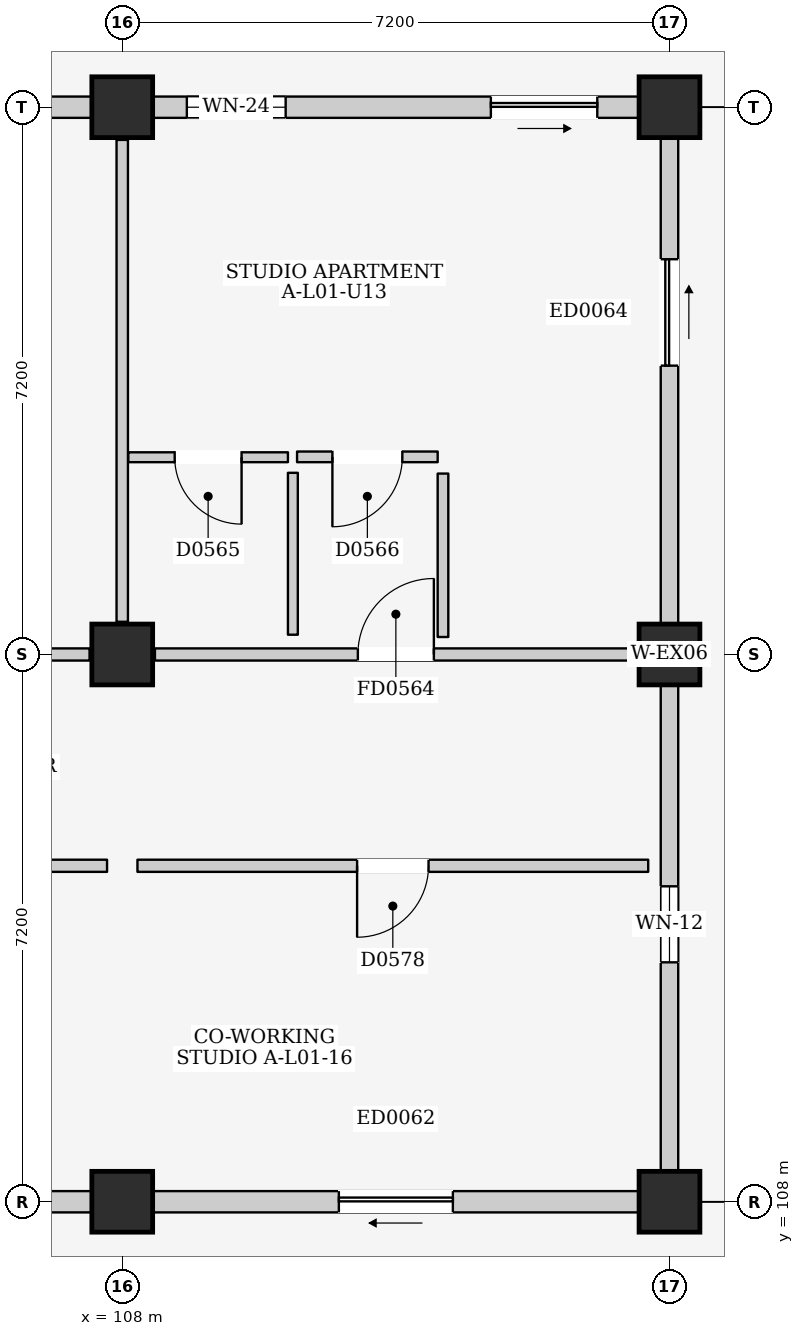
"""IFC4 building model, lengths in metres.
Left out: names, types, materials, properties, quantities, classifications, styles, units other than length and angle.
Written with IfcOpenShell. Run it as: python <this file> out.ifc"""

import sys

from ifc_helpers import new_model, si_unit, direction, frame, frame_2d, origin, origin_2d, place, context, subcontext, project, spatial, rectangle, extrude, element, fill, save


model = new_model("IFC4")
c1 = context("Model", 3, precision=1e-05, world=origin(), true_north=direction((0.0, 1.0)))
c2 = subcontext(c1, "Body", "Model", "MODEL_VIEW")
j1 = project(units=[si_unit("LENGTHUNIT", "METRE"), si_unit("PLANEANGLEUNIT", "RADIAN")], contexts=[c1])
p1 = place(None, origin())
s1 = spatial("IfcSite", under=j1, at=p1, CompositionType="ELEMENT")
p2 = place(p1, origin())
s2 = spatial("IfcBuilding", under=s1, at=p2, CompositionType="ELEMENT")
p3 = place(p2, frame((0.0, 0.0, 4.5)))
s3 = spatial("IfcBuildingStorey", under=s2, at=p3, CompositionType="ELEMENT", Elevation=4.5)
for number, where, z_axis, x_axis in (
    (1, (108.0, 108.0, 0.0), (0.0, 0.0, 1.0), (1.0, 0.0, 0.0)),
    (2, (108.0, 115.2, 0.0), (0.0, 0.0, 1.0), (1.0, 0.0, 0.0)),
    (3, (108.0, 122.4, 0.0), (0.0, 0.0, 1.0), (1.0, 0.0, 0.0)),
    (4, (115.2, 108.0, 0.0), (0.0, 0.0, 1.0), (1.0, 0.0, 0.0)),
    (5, (115.2, 115.2, 0.0), (0.0, 0.0, 1.0), (1.0, 0.0, 0.0)),
    (6, (115.2, 122.4, 0.0), (0.0, 0.0, 1.0), (1.0, 0.0, 0.0)),
):
    element("IfcColumn", number, at=place(p3, frame(where, z_axis=z_axis, x_axis=x_axis)), inside=s3, PredefinedType="COLUMN", context=c2, shape_type="SweptSolid", body=[
        extrude(rectangle(XDim=0.8, YDim=0.8, at=origin_2d()), origin(), (0.0, 0.0, 1.0), 4.5),
    ])
p4 = place(p3, frame((101.2, 122.4, 0.0), z_axis=(0.0, 0.0, 1.0), x_axis=(1.0, 0.0, 0.0)))
e7 = element("IfcWall", 7, at=p4, inside=s3, PredefinedType="ELEMENTEDWALL", context=c2, shape_type="SweptSolid", body=[
    extrude(rectangle(XDim=6.4, YDim=0.28, at=frame_2d((3.2, 0.0))), origin(), (0.0, 0.0, 1.0), 3.715),
])
p5 = place(p4, frame((3.85, 0.0, 0.0)))
e8 = element("IfcOpeningElement", 8, at=p5, cuts=e7, PredefinedType="OPENING", context=c2, shape_type="SweptSolid", body=[
    extrude(rectangle(XDim=2.0, YDim=2.12, at=frame_2d((1.0, 1.06))), frame((0.0, 0.155, 0.0), z_axis=(0.0, -1.0, 0.0), x_axis=(1.0, 0.0, 0.0)), (0.0, 0.0, 1.0), 0.31),
])
p6 = place(p4, frame((0.45, 0.0, 0.9)))
e9 = element("IfcOpeningElement", 9, at=p6, cuts=e7, PredefinedType="OPENING", context=c2, shape_type="SweptSolid", body=[
    extrude(rectangle(XDim=1.85, YDim=1.4, at=frame_2d((0.925, 0.7))), frame((0.0, 0.155, 0.0), z_axis=(0.0, -1.0, 0.0), x_axis=(1.0, 0.0, 0.0)), (0.0, 0.0, 1.0), 0.31),
])
p7 = place(p3, frame((101.2, 108.0, 0.0), z_axis=(0.0, 0.0, 1.0), x_axis=(1.0, 0.0, 0.0)))
e10 = element("IfcWall", 10, at=p7, inside=s3, PredefinedType="ELEMENTEDWALL", context=c2, shape_type="SweptSolid", body=[
    extrude(rectangle(XDim=6.4, YDim=0.28, at=frame_2d((3.2, 0.0))), origin(), (0.0, 0.0, 1.0), 3.585),
])
p8 = place(p7, frame((2.45, 0.0, 0.0)))
e11 = element("IfcOpeningElement", 11, at=p8, cuts=e10, PredefinedType="OPENING", context=c2, shape_type="SweptSolid", body=[
    extrude(rectangle(XDim=1.5, YDim=2.12, at=frame_2d((0.75, 1.06))), frame((0.0, 0.155, 0.0), z_axis=(0.0, -1.0, 0.0), x_axis=(1.0, 0.0, 0.0)), (0.0, 0.0, 1.0), 0.31),
])
p9 = place(p3, frame((108.4, 122.4, 0.0), z_axis=(0.0, 0.0, 1.0), x_axis=(1.0, 0.0, 0.0)))
e12 = element("IfcWall", 12, at=p9, inside=s3, PredefinedType="ELEMENTEDWALL", context=c2, shape_type="SweptSolid", body=[
    extrude(rectangle(XDim=6.4, YDim=0.28, at=frame_2d((3.2, 0.0))), origin(), (0.0, 0.0, 1.0), 3.715),
])
p10 = place(p9, frame((4.45, 0.0, 0.0)))
e13 = element("IfcOpeningElement", 13, at=p10, cuts=e12, PredefinedType="OPENING", context=c2, shape_type="SweptSolid", body=[
    extrude(rectangle(XDim=1.4, YDim=2.1, at=frame_2d((0.7, 1.05))), frame((0.0, 0.155, 0.0), z_axis=(0.0, -1.0, 0.0), x_axis=(1.0, 0.0, 0.0)), (0.0, 0.0, 1.0), 0.31),
])
p11 = place(p9, frame((0.45, 0.0, 0.9)))
e14 = element("IfcOpeningElement", 14, at=p11, cuts=e12, PredefinedType="OPENING", context=c2, shape_type="SweptSolid", body=[
    extrude(rectangle(XDim=1.3, YDim=1.25, at=frame_2d((0.65, 0.625))), frame((0.0, 0.155, 0.0), z_axis=(0.0, -1.0, 0.0), x_axis=(1.0, 0.0, 0.0)), (0.0, 0.0, 1.0), 0.31),
])
p12 = place(p3, frame((108.4, 108.0, 0.0), z_axis=(0.0, 0.0, 1.0), x_axis=(1.0, 0.0, 0.0)))
e15 = element("IfcWall", 15, at=p12, inside=s3, PredefinedType="ELEMENTEDWALL", context=c2, shape_type="SweptSolid", body=[
    extrude(rectangle(XDim=6.4, YDim=0.28, at=frame_2d((3.2, 0.0))), origin(), (0.0, 0.0, 1.0), 3.585),
])
p13 = place(p12, frame((2.45, 0.0, 0.0)))
e16 = element("IfcOpeningElement", 16, at=p13, cuts=e15, PredefinedType="OPENING", context=c2, shape_type="SweptSolid", body=[
    extrude(rectangle(XDim=1.5, YDim=2.12, at=frame_2d((0.75, 1.06))), frame((0.0, 0.155, 0.0), z_axis=(0.0, -1.0, 0.0), x_axis=(1.0, 0.0, 0.0)), (0.0, 0.0, 1.0), 0.31),
])
p14 = place(p3, frame((115.2, 108.4, 0.0), z_axis=(0.0, 0.0, 1.0), x_axis=(0.0, 1.0, 0.0)))
e17 = element("IfcWall", 17, at=p14, inside=s3, PredefinedType="ELEMENTEDWALL", context=c2, shape_type="SweptSolid", body=[
    extrude(rectangle(XDim=6.4, YDim=0.23, at=frame_2d((3.2, 0.0))), origin(), (0.0, 0.0, 1.0), 3.715),
])
p15 = place(p14, frame((2.75, 0.0, 1.1)))
e18 = element("IfcOpeningElement", 18, at=p15, cuts=e17, PredefinedType="OPENING", context=c2, shape_type="SweptSolid", body=[
    extrude(rectangle(XDim=1.0, YDim=0.9, at=frame_2d((0.5, 0.45))), frame((0.0, 0.13, 0.0), z_axis=(0.0, -1.0, 0.0), x_axis=(1.0, 0.0, 0.0)), (0.0, 0.0, 1.0), 0.26),
])
p16 = place(p3, frame((115.2, 115.6, 0.0), z_axis=(0.0, 0.0, 1.0), x_axis=(0.0, 1.0, 0.0)))
e19 = element("IfcWall", 19, at=p16, inside=s3, PredefinedType="ELEMENTEDWALL", context=c2, shape_type="SweptSolid", body=[
    extrude(rectangle(XDim=6.4, YDim=0.23, at=frame_2d((3.2, 0.0))), origin(), (0.0, 0.0, 1.0), 3.715),
])
p17 = place(p16, frame((3.4, 0.0, 0.0)))
e20 = element("IfcOpeningElement", 20, at=p17, cuts=e19, PredefinedType="OPENING", context=c2, shape_type="SweptSolid", body=[
    extrude(rectangle(XDim=1.4, YDim=2.1, at=frame_2d((0.7, 1.05))), frame((0.0, 0.13, 0.0), z_axis=(0.0, -1.0, 0.0), x_axis=(1.0, 0.0, 0.0)), (0.0, 0.0, 1.0), 0.26),
])
p18 = place(p3, frame((101.23, 115.2, 0.0), z_axis=(0.0, 0.0, 1.0), x_axis=(1.0, 0.0, 0.0)))
e21 = element("IfcWall", 21, at=p18, inside=s3, PredefinedType="PARTITIONING", context=c2, shape_type="SweptSolid", body=[
    extrude(rectangle(XDim=6.34, YDim=0.16, at=frame_2d((3.17, 0.0))), origin(), (0.0, 0.0, 1.0), 3.585),
])
p19 = place(p18, frame((2.67, 0.0, 0.0)))
e22 = element("IfcOpeningElement", 22, at=p19, cuts=e21, PredefinedType="OPENING", context=c2, shape_type="SweptSolid", body=[
    extrude(rectangle(XDim=1.0, YDim=2.15, at=frame_2d((0.5, 1.075))), frame((0.0, 0.095, 0.0), z_axis=(0.0, -1.0, 0.0), x_axis=(1.0, 0.0, 0.0)), (0.0, 0.0, 1.0), 0.19),
])
p20 = place(p3, frame((108.0, 115.63, 0.0), z_axis=(0.0, 0.0, 1.0), x_axis=(0.0, 1.0, 0.0)))
e23 = element("IfcWall", 23, at=p20, inside=s3, PredefinedType="PARTITIONING", context=c2, shape_type="SweptSolid", body=[
    extrude(rectangle(XDim=6.34, YDim=0.15, at=frame_2d((3.17, 0.0))), origin(), (0.0, 0.0, 1.0), 3.685),
])
p21 = place(p3, frame((108.43, 115.2, 0.0), z_axis=(0.0, 0.0, 1.0), x_axis=(1.0, 0.0, 0.0)))
e24 = element("IfcWall", 24, at=p21, inside=s3, PredefinedType="PARTITIONING", context=c2, shape_type="SweptSolid", body=[
    extrude(rectangle(XDim=6.34, YDim=0.16, at=frame_2d((3.17, 0.0))), origin(), (0.0, 0.0, 1.0), 3.585),
])
p22 = place(p21, frame((2.67, 0.0, 0.0)))
e25 = element("IfcOpeningElement", 25, at=p22, cuts=e24, PredefinedType="OPENING", context=c2, shape_type="SweptSolid", body=[
    extrude(rectangle(XDim=1.0, YDim=2.15, at=frame_2d((0.5, 1.075))), frame((0.0, 0.095, 0.0), z_axis=(0.0, -1.0, 0.0), x_axis=(1.0, 0.0, 0.0)), (0.0, 0.0, 1.0), 0.19),
])
p23 = place(p3, frame((108.08, 117.795, 0.0), z_axis=(0.0, 0.0, 1.0), x_axis=(1.0, 0.0, 0.0)))
e26 = element("IfcWall", 26, at=p23, inside=s3, PredefinedType="PARTITIONING", context=c2, shape_type="SweptSolid", body=[
    extrude(rectangle(XDim=2.1, YDim=0.13, at=frame_2d((1.05, 0.0))), origin(), (0.0, 0.0, 1.0), 4.25),
])
p24 = place(p23, frame((0.61, 0.0, 0.0)))
e27 = element("IfcOpeningElement", 27, at=p24, cuts=e26, PredefinedType="OPENING", context=c2, shape_type="SweptSolid", body=[
    extrude(rectangle(XDim=0.88, YDim=2.1, at=frame_2d((0.44, 1.05))), frame((0.0, 0.08, 0.0), z_axis=(0.0, -1.0, 0.0), x_axis=(1.0, 0.0, 0.0)), (0.0, 0.0, 1.0), 0.16),
])
p25 = place(p3, frame((110.245, 115.46, 0.0), z_axis=(0.0, 0.0, 1.0), x_axis=(0.0, 1.0, 0.0)))
e28 = element("IfcWall", 28, at=p25, inside=s3, PredefinedType="PARTITIONING", context=c2, shape_type="SweptSolid", body=[
    extrude(rectangle(XDim=2.13, YDim=0.13, at=frame_2d((1.065, 0.0))), origin(), (0.0, 0.0, 1.0), 4.25),
])
p26 = place(p3, frame((110.3, 117.8, 0.0), z_axis=(0.0, 0.0, 1.0), x_axis=(1.0, 0.0, 0.0)))
e29 = element("IfcWall", 29, at=p26, inside=s3, PredefinedType="PARTITIONING", context=c2, shape_type="SweptSolid", body=[
    extrude(rectangle(XDim=1.85, YDim=0.14, at=frame_2d((0.925, 0.0))), origin(), (0.0, 0.0, 1.0), 4.25),
])
p27 = place(p26, frame((0.465, 0.0, 0.0)))
e30 = element("IfcOpeningElement", 30, at=p27, cuts=e29, PredefinedType="OPENING", context=c2, shape_type="SweptSolid", body=[
    extrude(rectangle(XDim=0.92, YDim=2.1, at=frame_2d((0.46, 1.05))), frame((0.0, 0.085, 0.0), z_axis=(0.0, -1.0, 0.0), x_axis=(1.0, 0.0, 0.0)), (0.0, 0.0, 1.0), 0.17),
])
p28 = place(p3, frame((112.22, 115.43, 0.0), z_axis=(0.0, 0.0, 1.0), x_axis=(0.0, 1.0, 0.0)))
e31 = element("IfcWall", 31, at=p28, inside=s3, PredefinedType="PARTITIONING", context=c2, shape_type="SweptSolid", body=[
    extrude(rectangle(XDim=2.15, YDim=0.14, at=frame_2d((1.075, 0.0))), origin(), (0.0, 0.0, 1.0), 4.25),
])
p29 = place(p3, frame((101.0, 112.42, 0.0), z_axis=(0.0, 0.0, 1.0), x_axis=(1.0, 0.0, 0.0)))
e32 = element("IfcWall", 32, at=p29, inside=s3, PredefinedType="PARTITIONING", context=c2, shape_type="SweptSolid", body=[
    extrude(rectangle(XDim=6.8, YDim=0.16, at=frame_2d((3.4, 0.0))), origin(), (0.0, 0.0, 1.0), 4.25),
])
p30 = place(p29, frame((2.93, 0.0, 0.0)))
e33 = element("IfcOpeningElement", 33, at=p30, cuts=e32, PredefinedType="OPENING", context=c2, shape_type="SweptSolid", body=[
    extrude(rectangle(XDim=0.94, YDim=2.12, at=frame_2d((0.47, 1.06))), frame((0.0, 0.095, 0.0), z_axis=(0.0, -1.0, 0.0), x_axis=(1.0, 0.0, 0.0)), (0.0, 0.0, 1.0), 0.19),
])
p31 = place(p3, frame((108.2, 112.42, 0.0), z_axis=(0.0, 0.0, 1.0), x_axis=(1.0, 0.0, 0.0)))
e34 = element("IfcWall", 34, at=p31, inside=s3, PredefinedType="PARTITIONING", context=c2, shape_type="SweptSolid", body=[
    extrude(rectangle(XDim=6.72, YDim=0.16, at=frame_2d((3.36, 0.0))), origin(), (0.0, 0.0, 1.0), 4.25),
])
p32 = place(p31, frame((2.89, 0.0, 0.0)))
e35 = element("IfcOpeningElement", 35, at=p32, cuts=e34, PredefinedType="OPENING", context=c2, shape_type="SweptSolid", body=[
    extrude(rectangle(XDim=0.94, YDim=2.12, at=frame_2d((0.47, 1.06))), frame((0.0, 0.095, 0.0), z_axis=(0.0, -1.0, 0.0), x_axis=(1.0, 0.0, 0.0)), (0.0, 0.0, 1.0), 0.19),
])
p33 = place(p10, frame((1.4, 0.0, 0.0), z_axis=(0.0, 0.0, 1.0), x_axis=(-1.0, 0.0, 0.0)))
e36 = element("IfcDoor", 36, at=p33, inside=s3, OperationType="SLIDING_TO_RIGHT", PredefinedType="DOOR", context=c2, shape_type="SweptSolid", body=[
    extrude(rectangle(XDim=1.4, YDim=2.1, at=frame_2d((0.7, 1.05))), frame((0.0, 0.025, 0.0), z_axis=(0.0, -1.0, 0.0), x_axis=(1.0, 0.0, 0.0)), (0.0, 0.0, 1.0), 0.05),
])
fill(e13, e36)
p34 = place(p11, origin())
e37 = element("IfcWindow", 37, at=p34, inside=s3, PartitioningType="SINGLE_PANEL", PredefinedType="WINDOW", context=c2, shape_type="SweptSolid", body=[
    extrude(rectangle(XDim=1.3, YDim=1.25, at=frame_2d((0.65, 0.625))), frame((0.0, 0.03, 0.0), z_axis=(0.0, -1.0, 0.0), x_axis=(1.0, 0.0, 0.0)), (0.0, 0.0, 1.0), 0.06),
])
fill(e14, e37)
p35 = place(p13, frame((1.5, 0.0, 0.0), z_axis=(0.0, 0.0, 1.0), x_axis=(-1.0, 0.0, 0.0)))
e38 = element("IfcDoor", 38, at=p35, inside=s3, OperationType="SLIDING_TO_LEFT", PredefinedType="DOOR", context=c2, shape_type="SweptSolid", body=[
    extrude(rectangle(XDim=1.5, YDim=2.12, at=frame_2d((0.75, 1.06))), frame((0.0, 0.025, 0.0), z_axis=(0.0, -1.0, 0.0), x_axis=(1.0, 0.0, 0.0)), (0.0, 0.0, 1.0), 0.05),
])
fill(e16, e38)
p36 = place(p15, origin())
e39 = element("IfcWindow", 39, at=p36, inside=s3, PartitioningType="SINGLE_PANEL", PredefinedType="WINDOW", context=c2, shape_type="SweptSolid", body=[
    extrude(rectangle(XDim=1.0, YDim=0.9, at=frame_2d((0.5, 0.45))), frame((0.0, 0.03, 0.0), z_axis=(0.0, -1.0, 0.0), x_axis=(1.0, 0.0, 0.0)), (0.0, 0.0, 1.0), 0.06),
])
fill(e18, e39)
p37 = place(p17, frame((1.4, 0.0, 0.0), z_axis=(0.0, 0.0, 1.0), x_axis=(-1.0, 0.0, 0.0)))
e40 = element("IfcDoor", 40, at=p37, inside=s3, OperationType="SLIDING_TO_RIGHT", PredefinedType="DOOR", context=c2, shape_type="SweptSolid", body=[
    extrude(rectangle(XDim=1.4, YDim=2.1, at=frame_2d((0.7, 1.05))), frame((0.0, 0.025, 0.0), z_axis=(0.0, -1.0, 0.0), x_axis=(1.0, 0.0, 0.0)), (0.0, 0.0, 1.0), 0.05),
])
fill(e20, e40)
p38 = place(p22, origin())
e41 = element("IfcDoor", 41, at=p38, inside=s3, OperationType="SINGLE_SWING_RIGHT", PredefinedType="DOOR", context=c2, shape_type="SweptSolid", body=[
    extrude(rectangle(XDim=1.0, YDim=2.15, at=frame_2d((0.5, 1.075))), frame((0.0, 0.025, 0.0), z_axis=(0.0, -1.0, 0.0), x_axis=(1.0, 0.0, 0.0)), (0.0, 0.0, 1.0), 0.05),
])
fill(e25, e41)
p39 = place(p24, frame((0.88, 0.0, 0.0), z_axis=(0.0, 0.0, 1.0), x_axis=(-1.0, 0.0, 0.0)))
e42 = element("IfcDoor", 42, at=p39, inside=s3, OperationType="SINGLE_SWING_LEFT", PredefinedType="DOOR", context=c2, shape_type="SweptSolid", body=[
    extrude(rectangle(XDim=0.88, YDim=2.1, at=frame_2d((0.44, 1.05))), frame((0.0, 0.025, 0.0), z_axis=(0.0, -1.0, 0.0), x_axis=(1.0, 0.0, 0.0)), (0.0, 0.0, 1.0), 0.05),
])
fill(e27, e42)
p40 = place(p27, frame((0.92, 0.0, 0.0), z_axis=(0.0, 0.0, 1.0), x_axis=(-1.0, 0.0, 0.0)))
e43 = element("IfcDoor", 43, at=p40, inside=s3, OperationType="SINGLE_SWING_RIGHT", PredefinedType="DOOR", context=c2, shape_type="SweptSolid", body=[
    extrude(rectangle(XDim=0.92, YDim=2.1, at=frame_2d((0.46, 1.05))), frame((0.0, 0.025, 0.0), z_axis=(0.0, -1.0, 0.0), x_axis=(1.0, 0.0, 0.0)), (0.0, 0.0, 1.0), 0.05),
])
fill(e30, e43)
p41 = place(p32, frame((0.94, 0.0, 0.0), z_axis=(0.0, 0.0, 1.0), x_axis=(-1.0, 0.0, 0.0)))
e44 = element("IfcDoor", 44, at=p41, inside=s3, OperationType="SINGLE_SWING_RIGHT", PredefinedType="DOOR", context=c2, shape_type="SweptSolid", body=[
    extrude(rectangle(XDim=0.94, YDim=2.12, at=frame_2d((0.47, 1.06))), frame((0.0, 0.025, 0.0), z_axis=(0.0, -1.0, 0.0), x_axis=(1.0, 0.0, 0.0)), (0.0, 0.0, 1.0), 0.05),
])
fill(e35, e44)
save(model, sys.argv[1])
